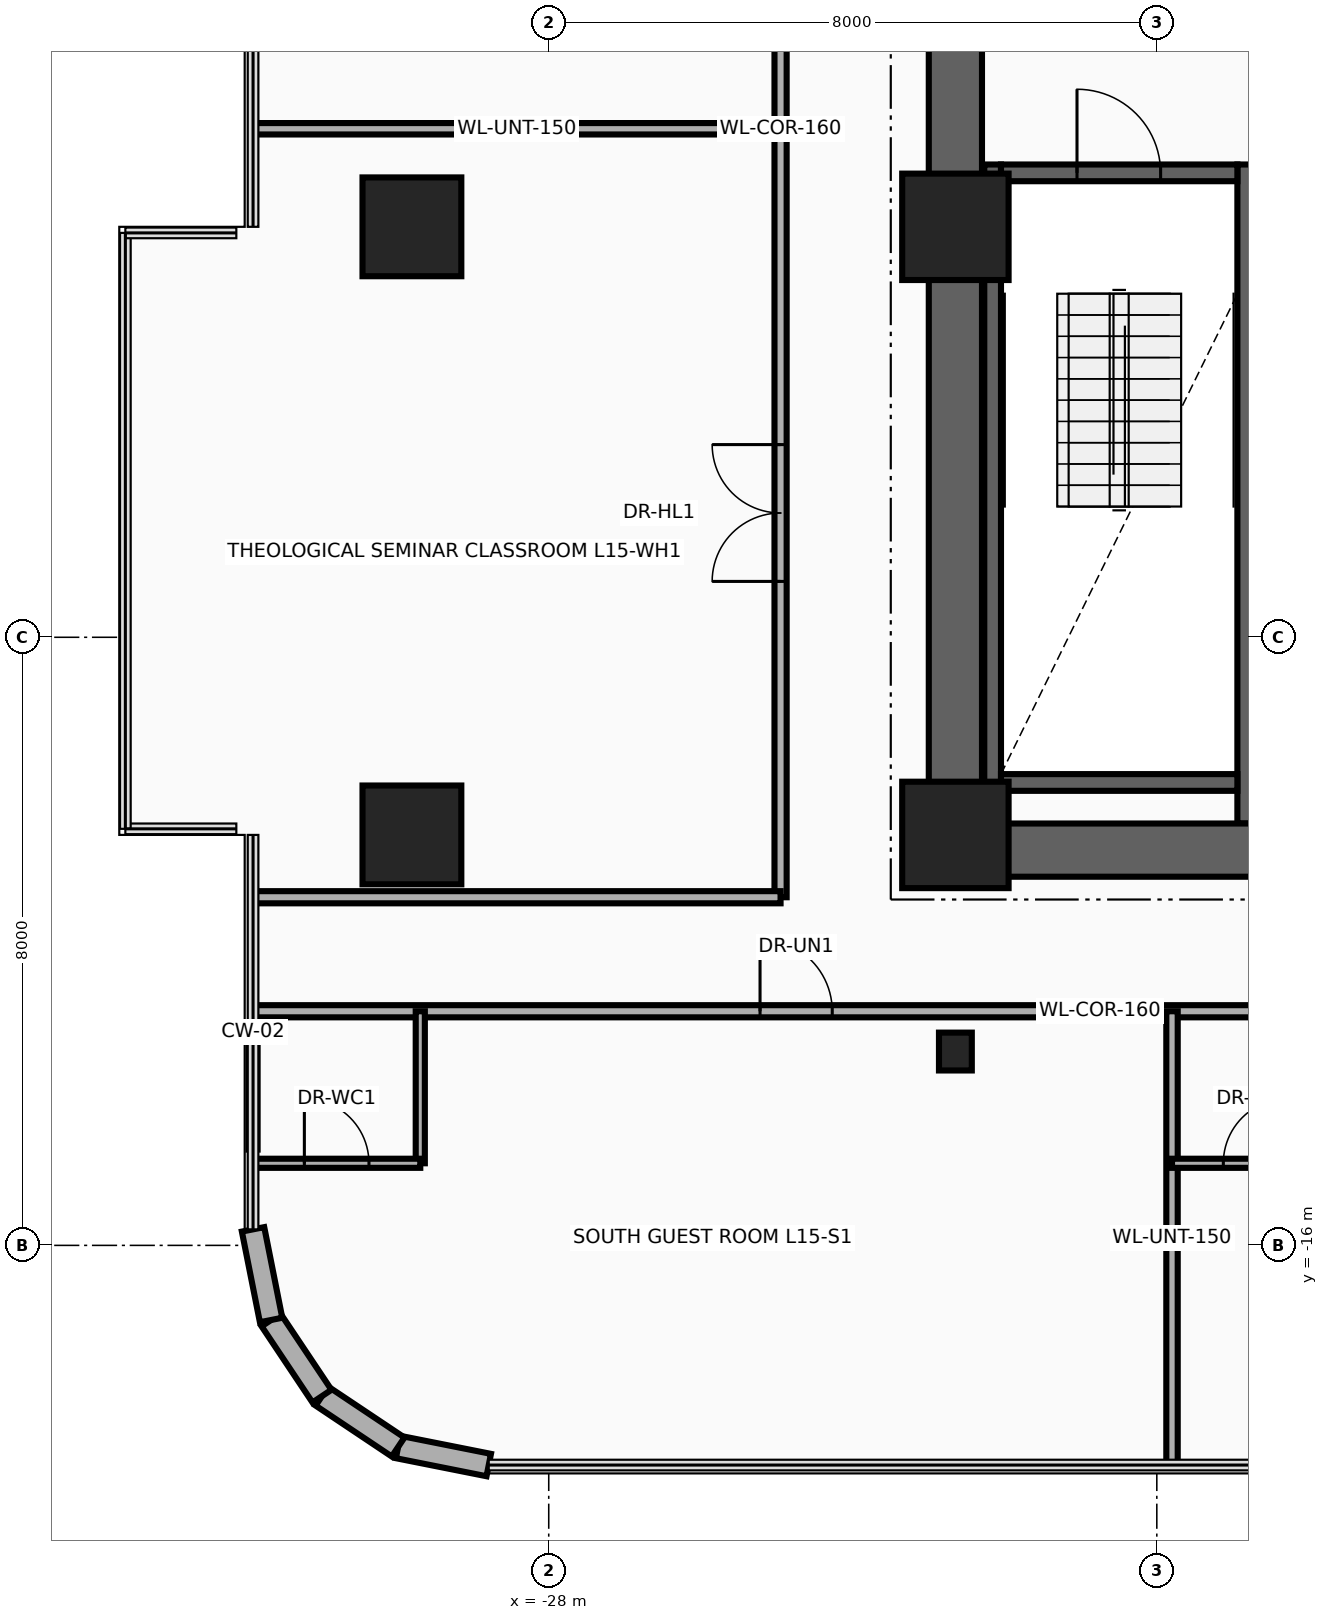
"""IFC4 building model, lengths in metres.
Left out: names, types, materials, properties, quantities, classifications, styles, units other than length and angle.
Written with IfcOpenShell. Run it as: python <this file> out.ifc"""

import sys

from ifc_helpers import new_model, si_unit, direction, frame, frame_2d, origin, origin_2d, place, context, subcontext, project, spatial, rectangle, circle, i_section, extrude, source, transform, mapped, element, fill, save


model = new_model("IFC4")
c1 = context("Model", 3, precision=1e-05, world=origin(), true_north=direction((0.0, 1.0)))
c2 = subcontext(c1, "Body", "Model", "MODEL_VIEW")
j1 = project(units=[si_unit("LENGTHUNIT", "METRE"), si_unit("PLANEANGLEUNIT", "RADIAN")], contexts=[c1])
p1 = place(None, origin())
s1 = spatial("IfcSite", under=j1, at=p1, CompositionType="ELEMENT")
p2 = place(p1, origin())
s2 = spatial("IfcBuilding", under=s1, at=p2, CompositionType="ELEMENT")
p3 = place(p2, frame((0.0, 0.0, 63.0)))
s3 = spatial("IfcBuildingStorey", under=s2, at=p3, CompositionType="ELEMENT", Elevation=63.0)
for number, where, z_axis, x_axis in (
    (1, (-22.16, -10.45, 0.0), (0.0, 0.0, 1.0), (0.0, 1.0, 0.0)),
    (2, (-18.83, -10.45, 0.0), (0.0, 0.0, 1.0), (0.0, 1.0, 0.0)),
):
    element("IfcWall", number, at=place(p3, frame(where, z_axis=z_axis, x_axis=x_axis)), inside=s3, PredefinedType="SHEAR", context=c2, shape_type="SweptSolid", body=[
        extrude(rectangle(XDim=8.67, YDim=0.22, at=frame_2d((4.335, 0.0))), origin(), (0.0, 0.0, 1.0), 3.46),
    ])
p4 = place(p3, frame((-22.05, -9.91, 0.0), z_axis=(0.0, 0.0, 1.0), x_axis=(1.0, 0.0, 0.0)))
e3 = element("IfcWall", 3, at=p4, inside=s3, PredefinedType="SHEAR", context=c2, shape_type="SweptSolid", body=[
    extrude(rectangle(XDim=3.11, YDim=0.22, at=frame_2d((1.555, 0.0))), origin(), (0.0, 0.0, 1.0), 3.46),
])
p5 = place(p3, frame((-22.05, -1.89, 0.0), z_axis=(0.0, 0.0, 1.0), x_axis=(1.0, 0.0, 0.0)))
e4 = element("IfcWall", 4, at=p5, inside=s3, PredefinedType="SHEAR", context=c2, shape_type="SweptSolid", body=[
    extrude(rectangle(XDim=3.11, YDim=0.22, at=frame_2d((1.555, 0.0))), origin(), (0.0, 0.0, 1.0), 3.46),
])
p6 = place(p5, frame((1.0, 0.0, 0.0)))
e5 = element("IfcOpeningElement", 5, at=p6, cuts=e4, PredefinedType="OPENING", context=c2, shape_type="SweptSolid", body=[
    extrude(rectangle(XDim=1.1, YDim=2.15, at=frame_2d((0.55, 1.075))), frame((0.0, 0.125, 0.0), z_axis=(0.0, -1.0, 0.0), x_axis=(1.0, 0.0, 0.0)), (0.0, 0.0, 1.0), 0.25),
])
p7 = place(p3, frame((-22.65, -11.15, 0.0), z_axis=(0.0, 0.0, 1.0), x_axis=(0.0, 1.0, 0.0)))
e6 = element("IfcWall", 6, at=p7, inside=s3, PredefinedType="SHEAR", context=c2, shape_type="SweptSolid", body=[
    extrude(rectangle(XDim=22.3, YDim=0.7, at=frame_2d((11.15, 0.0))), origin(), (0.0, 0.0, 1.0), 3.46),
])
p8 = place(p3, frame((-22.65, -10.8, 0.0), z_axis=(0.0, 0.0, 1.0), x_axis=(1.0, 0.0, 0.0)))
e7 = element("IfcWall", 7, at=p8, inside=s3, PredefinedType="SHEAR", context=c2, shape_type="SweptSolid", body=[
    extrude(rectangle(XDim=10.25, YDim=0.7, at=frame_2d((5.125, 0.0))), origin(), (0.0, 0.0, 1.0), 3.46),
])
m1 = source(origin(), c2, "Body", "SweptSolid", [
    extrude(circle(Radius=0.65, at=origin_2d()), origin(), (0.0, 0.0, 1.0), 3.7),
])
p9 = place(p3, frame((-29.8, -10.6, 0.0), z_axis=(0.0, 0.0, 1.0), x_axis=(1.0, 0.0, 0.0)))
e8 = element("IfcColumn", 8, at=p9, inside=s3, PredefinedType="COLUMN", context=c2, shape_type="MappedRepresentation", body=[
    mapped(m1, transform((0.0, 0.0, 0.0), x_axis=(1.0, 0.0, 0.0), y_axis=(0.0, 1.0, 0.0), z_axis=(0.0, 0.0, 1.0), scale=1.0)),
])
m2 = source(origin(), c2, "Body", "SweptSolid", [
    extrude(rectangle(XDim=1.4, YDim=1.4, at=origin_2d()), origin(), (0.0, 0.0, 1.0), 3.7),
])
p10 = place(p3, frame((-22.65, -10.6, 0.0), z_axis=(0.0, 0.0, 1.0), x_axis=(1.0, 0.0, 0.0)))
e9 = element("IfcColumn", 9, at=p10, inside=s3, PredefinedType="COLUMN", context=c2, shape_type="MappedRepresentation", body=[
    mapped(m2, transform((0.0, 0.0, 0.0), x_axis=(1.0, 0.0, 0.0), y_axis=(0.0, 1.0, 0.0), z_axis=(0.0, 0.0, 1.0), scale=1.0)),
])
p11 = place(p3, frame((-29.8, -2.6, 0.0), z_axis=(0.0, 0.0, 1.0), x_axis=(1.0, 0.0, 0.0)))
e10 = element("IfcColumn", 10, at=p11, inside=s3, PredefinedType="COLUMN", context=c2, shape_type="MappedRepresentation", body=[
    mapped(m1, transform((0.0, 0.0, 0.0), x_axis=(1.0, 0.0, 0.0), y_axis=(0.0, 1.0, 0.0), z_axis=(0.0, 0.0, 1.0), scale=1.0)),
])
p12 = place(p3, frame((-22.65, -2.6, 0.0), z_axis=(0.0, 0.0, 1.0), x_axis=(1.0, 0.0, 0.0)))
e11 = element("IfcColumn", 11, at=p12, inside=s3, PredefinedType="COLUMN", context=c2, shape_type="MappedRepresentation", body=[
    mapped(m2, transform((0.0, 0.0, 0.0), x_axis=(1.0, 0.0, 0.0), y_axis=(0.0, 1.0, 0.0), z_axis=(0.0, 0.0, 1.0), scale=1.0)),
])
m3 = source(origin(), c2, "Body", "SweptSolid", [
    extrude(i_section(OverallWidth=0.432, OverallDepth=0.498, WebThickness=0.056, FlangeThickness=0.089, at=origin_2d()), origin(), (0.0, 0.0, 1.0), 3.7),
])
p13 = place(p3, frame((-22.65, -13.45, 0.0), z_axis=(0.0, 0.0, 1.0), x_axis=(1.0, 0.0, 0.0)))
e12 = element("IfcColumn", 12, at=p13, inside=s3, PredefinedType="COLUMN", context=c2, shape_type="MappedRepresentation", body=[
    mapped(m3, transform((0.0, 0.0, 0.0), x_axis=(1.0, 0.0, 0.0), y_axis=(0.0, 1.0, 0.0), z_axis=(0.0, 0.0, 1.0), scale=1.0)),
])
p14 = place(p3, frame((-28.789, -18.89, 0.0), z_axis=(0.0, 0.0, 1.0), x_axis=(-0.980804027463, 0.194996050505, 0.0)))
e13 = element("IfcWall", 13, at=p14, inside=s3, PredefinedType="SOLIDWALL", context=c2, shape_type="SweptSolid", body=[
    extrude(rectangle(XDim=1.216, YDim=0.3, at=frame_2d((0.608, 0.0))), origin(), (0.0, 0.0, 1.0), 3.46),
])
for number, where, z_axis, x_axis in (
    (14, (-29.982, -18.653, 0.0), (0.0, 0.0, 1.0), (-0.831, 0.556, 0.0)),
    (15, (-30.983, -17.983, 0.0), (0.0, 0.0, 1.0), (-0.556, 0.831, 0.0)),
):
    element("IfcWall", number, at=place(p3, frame(where, z_axis=z_axis, x_axis=x_axis)), inside=s3, PredefinedType="SOLIDWALL", context=c2, shape_type="SweptSolid", body=[
        extrude(rectangle(XDim=1.205, YDim=0.3, at=frame_2d((0.603, 0.0))), origin(), (0.0, 0.0, 1.0), 3.46),
    ])
p15 = place(p3, frame((-31.653, -16.982, 0.0), z_axis=(0.0, 0.0, 1.0), x_axis=(-0.194996050505, 0.980804027463, 0.0)))
e16 = element("IfcWall", 16, at=p15, inside=s3, PredefinedType="SOLIDWALL", context=c2, shape_type="SweptSolid", body=[
    extrude(rectangle(XDim=1.216, YDim=0.3, at=frame_2d((0.608, 0.0))), origin(), (0.0, 0.0, 1.0), 3.46),
])
p16 = place(p3, frame((-24.95, -11.42, 0.0), z_axis=(0.0, 0.0, 1.0), x_axis=(0.0, 1.0, 0.0)))
e17 = element("IfcWall", 17, at=p16, inside=s3, PredefinedType="PARTITIONING", context=c2, shape_type="SweptSolid", body=[
    extrude(rectangle(XDim=20.22, YDim=0.16, at=frame_2d((10.11, 0.0))), origin(), (0.0, 0.0, 1.0), 2.583),
])
p17 = place(p16, frame((4.155, 0.0, 0.0)))
e18 = element("IfcOpeningElement", 18, at=p17, cuts=e17, PredefinedType="OPENING", context=c2, shape_type="SweptSolid", body=[
    extrude(rectangle(XDim=1.8, YDim=2.15, at=frame_2d((0.9, 1.075))), frame((0.0, 0.095, 0.0), z_axis=(0.0, -1.0, 0.0), x_axis=(1.0, 0.0, 0.0)), (0.0, 0.0, 1.0), 0.19),
])
p18 = place(p16, frame((14.265, 0.0, 0.0)))
e19 = element("IfcOpeningElement", 19, at=p18, cuts=e17, PredefinedType="OPENING", context=c2, shape_type="SweptSolid", body=[
    extrude(rectangle(XDim=1.8, YDim=2.15, at=frame_2d((0.9, 1.075))), frame((0.0, 0.095, 0.0), z_axis=(0.0, -1.0, 0.0), x_axis=(1.0, 0.0, 0.0)), (0.0, 0.0, 1.0), 0.19),
])
p19 = place(p3, frame((-31.89, -1.31, 0.0), z_axis=(0.0, 0.0, 1.0), x_axis=(1.0, 0.0, 0.0)))
e20 = element("IfcWall", 20, at=p19, inside=s3, PredefinedType="PARTITIONING", context=c2, shape_type="SweptSolid", body=[
    extrude(rectangle(XDim=6.94, YDim=0.15, at=frame_2d((3.47, 0.0))), origin(), (0.0, 0.0, 1.0), 2.896),
])
p20 = place(p3, frame((-31.89, -12.92, 0.0), z_axis=(0.0, 0.0, 1.0), x_axis=(1.0, 0.0, 0.0)))
e21 = element("IfcWall", 21, at=p20, inside=s3, PredefinedType="PARTITIONING", context=c2, shape_type="SweptSolid", body=[
    extrude(rectangle(XDim=22.28, YDim=0.16, at=frame_2d((11.14, 0.0))), origin(), (0.0, 0.0, 1.0), 2.834),
])
p21 = place(p20, frame((6.67, 0.0, 0.0)))
e22 = element("IfcOpeningElement", 22, at=p21, cuts=e21, PredefinedType="OPENING", context=c2, shape_type="SweptSolid", body=[
    extrude(rectangle(XDim=0.95, YDim=2.15, at=frame_2d((0.475, 1.075))), frame((0.0, 0.095, 0.0), z_axis=(0.0, -1.0, 0.0), x_axis=(1.0, 0.0, 0.0)), (0.0, 0.0, 1.0), 0.19),
])
p22 = place(p20, frame((17.81, 0.0, 0.0)))
e23 = element("IfcOpeningElement", 23, at=p22, cuts=e21, PredefinedType="OPENING", context=c2, shape_type="SweptSolid", body=[
    extrude(rectangle(XDim=0.95, YDim=2.15, at=frame_2d((0.475, 1.075))), frame((0.0, 0.095, 0.0), z_axis=(0.0, -1.0, 0.0), x_axis=(1.0, 0.0, 0.0)), (0.0, 0.0, 1.0), 0.19),
])
p23 = place(p3, frame((-19.8, -18.89, 0.0), z_axis=(0.0, 0.0, 1.0), x_axis=(0.0, 1.0, 0.0)))
e24 = element("IfcWall", 24, at=p23, inside=s3, PredefinedType="PARTITIONING", context=c2, shape_type="SweptSolid", body=[
    extrude(rectangle(XDim=5.97, YDim=0.15, at=frame_2d((2.985, 0.0))), origin(), (0.0, 0.0, 1.0), 2.896),
])
p24 = place(p3, frame((-29.69, -14.92, 0.0), z_axis=(0.0, 0.0, 1.0), x_axis=(0.0, 1.0, 0.0)))
e25 = element("IfcWall", 25, at=p24, inside=s3, PredefinedType="PARTITIONING", context=c2, shape_type="SweptSolid", body=[
    extrude(rectangle(XDim=2.0, YDim=0.12, at=frame_2d((1.0, 0.0))), origin(), (0.0, 0.0, 1.0), 3.46),
])
p25 = place(p3, frame((-31.89, -14.92, 0.0), z_axis=(0.0, 0.0, 1.0), x_axis=(1.0, 0.0, 0.0)))
e26 = element("IfcWall", 26, at=p25, inside=s3, PredefinedType="PARTITIONING", context=c2, shape_type="SweptSolid", body=[
    extrude(rectangle(XDim=2.2, YDim=0.12, at=frame_2d((1.1, 0.0))), origin(), (0.0, 0.0, 1.0), 3.46),
])
p26 = place(p25, frame((0.675, 0.0, 0.0)))
e27 = element("IfcOpeningElement", 27, at=p26, cuts=e26, PredefinedType="OPENING", context=c2, shape_type="SweptSolid", body=[
    extrude(rectangle(XDim=0.85, YDim=2.1, at=frame_2d((0.425, 1.05))), frame((0.0, 0.075, 0.0), z_axis=(0.0, -1.0, 0.0), x_axis=(1.0, 0.0, 0.0)), (0.0, 0.0, 1.0), 0.15),
])
p27 = place(p3, frame((-31.89, -14.74, 0.0), z_axis=(0.0, 0.0, 1.0), x_axis=(0.0, 1.0, 0.0)))
e28 = element("IfcWall", 28, at=p27, inside=s3, PredefinedType="PARTITIONING", context=c2, shape_type="SweptSolid", body=[
    extrude(rectangle(XDim=1.62, YDim=0.12, at=frame_2d((0.81, 0.0))), origin(), (0.0, 0.0, 1.0), 3.46),
])
p28 = place(p3, frame((-19.8, -14.92, 0.0), z_axis=(0.0, 0.0, 1.0), x_axis=(1.0, 0.0, 0.0)))
e29 = element("IfcWall", 29, at=p28, inside=s3, PredefinedType="PARTITIONING", context=c2, shape_type="SweptSolid", body=[
    extrude(rectangle(XDim=2.2, YDim=0.12, at=frame_2d((1.1, 0.0))), origin(), (0.0, 0.0, 1.0), 3.46),
])
p29 = place(p28, frame((0.675, 0.0, 0.0)))
e30 = element("IfcOpeningElement", 30, at=p29, cuts=e29, PredefinedType="OPENING", context=c2, shape_type="SweptSolid", body=[
    extrude(rectangle(XDim=0.85, YDim=2.1, at=frame_2d((0.425, 1.05))), frame((0.0, 0.075, 0.0), z_axis=(0.0, -1.0, 0.0), x_axis=(1.0, 0.0, 0.0)), (0.0, 0.0, 1.0), 0.15),
])
p30 = place(p3, frame((-31.89, -11.42, 0.0), z_axis=(0.0, 0.0, 1.0), x_axis=(1.0, 0.0, 0.0)))
e31 = element("IfcWall", 31, at=p30, inside=s3, PredefinedType="PARTITIONING", context=c2, shape_type="SweptSolid", body=[
    extrude(rectangle(XDim=6.94, YDim=0.16, at=frame_2d((3.47, 0.0))), origin(), (0.0, 0.0, 1.0), 3.46),
])
p31 = place(p6, origin())
e32 = element("IfcDoor", 32, at=p31, inside=s3, OperationType="SINGLE_SWING_RIGHT", PredefinedType="DOOR", context=c2, shape_type="SweptSolid", body=[
    extrude(rectangle(XDim=1.1, YDim=2.15, at=frame_2d((0.55, 1.075))), frame((0.0, 0.025, 0.0), z_axis=(0.0, -1.0, 0.0), x_axis=(1.0, 0.0, 0.0)), (0.0, 0.0, 1.0), 0.05),
])
fill(e5, e32)
p32 = place(p17, origin())
e33 = element("IfcDoor", 33, at=p32, inside=s3, OperationType="DOUBLE_DOOR_SINGLE_SWING", PredefinedType="DOOR", context=c2, shape_type="SweptSolid", body=[
    extrude(rectangle(XDim=1.8, YDim=2.15, at=frame_2d((0.9, 1.075))), frame((0.0, 0.025, 0.0), z_axis=(0.0, -1.0, 0.0), x_axis=(1.0, 0.0, 0.0)), (0.0, 0.0, 1.0), 0.05),
])
fill(e18, e33)
p33 = place(p21, origin())
e34 = element("IfcDoor", 34, at=p33, inside=s3, OperationType="SINGLE_SWING_RIGHT", PredefinedType="DOOR", context=c2, shape_type="SweptSolid", body=[
    extrude(rectangle(XDim=0.95, YDim=2.15, at=frame_2d((0.475, 1.075))), frame((0.0, 0.025, 0.0), z_axis=(0.0, -1.0, 0.0), x_axis=(1.0, 0.0, 0.0)), (0.0, 0.0, 1.0), 0.05),
])
fill(e22, e34)
p34 = place(p26, origin())
e35 = element("IfcDoor", 35, at=p34, inside=s3, OperationType="SINGLE_SWING_LEFT", PredefinedType="DOOR", context=c2, shape_type="SweptSolid", body=[
    extrude(rectangle(XDim=0.85, YDim=2.1, at=frame_2d((0.425, 1.05))), frame((0.0, 0.025, 0.0), z_axis=(0.0, -1.0, 0.0), x_axis=(1.0, 0.0, 0.0)), (0.0, 0.0, 1.0), 0.05),
])
fill(e27, e35)
p35 = place(p29, origin())
e36 = element("IfcDoor", 36, at=p35, inside=s3, OperationType="SINGLE_SWING_LEFT", PredefinedType="DOOR", context=c2, shape_type="SweptSolid", body=[
    extrude(rectangle(XDim=0.85, YDim=2.1, at=frame_2d((0.425, 1.05))), frame((0.0, 0.025, 0.0), z_axis=(0.0, -1.0, 0.0), x_axis=(1.0, 0.0, 0.0)), (0.0, 0.0, 1.0), 0.05),
])
fill(e30, e36)
save(model, sys.argv[1])
